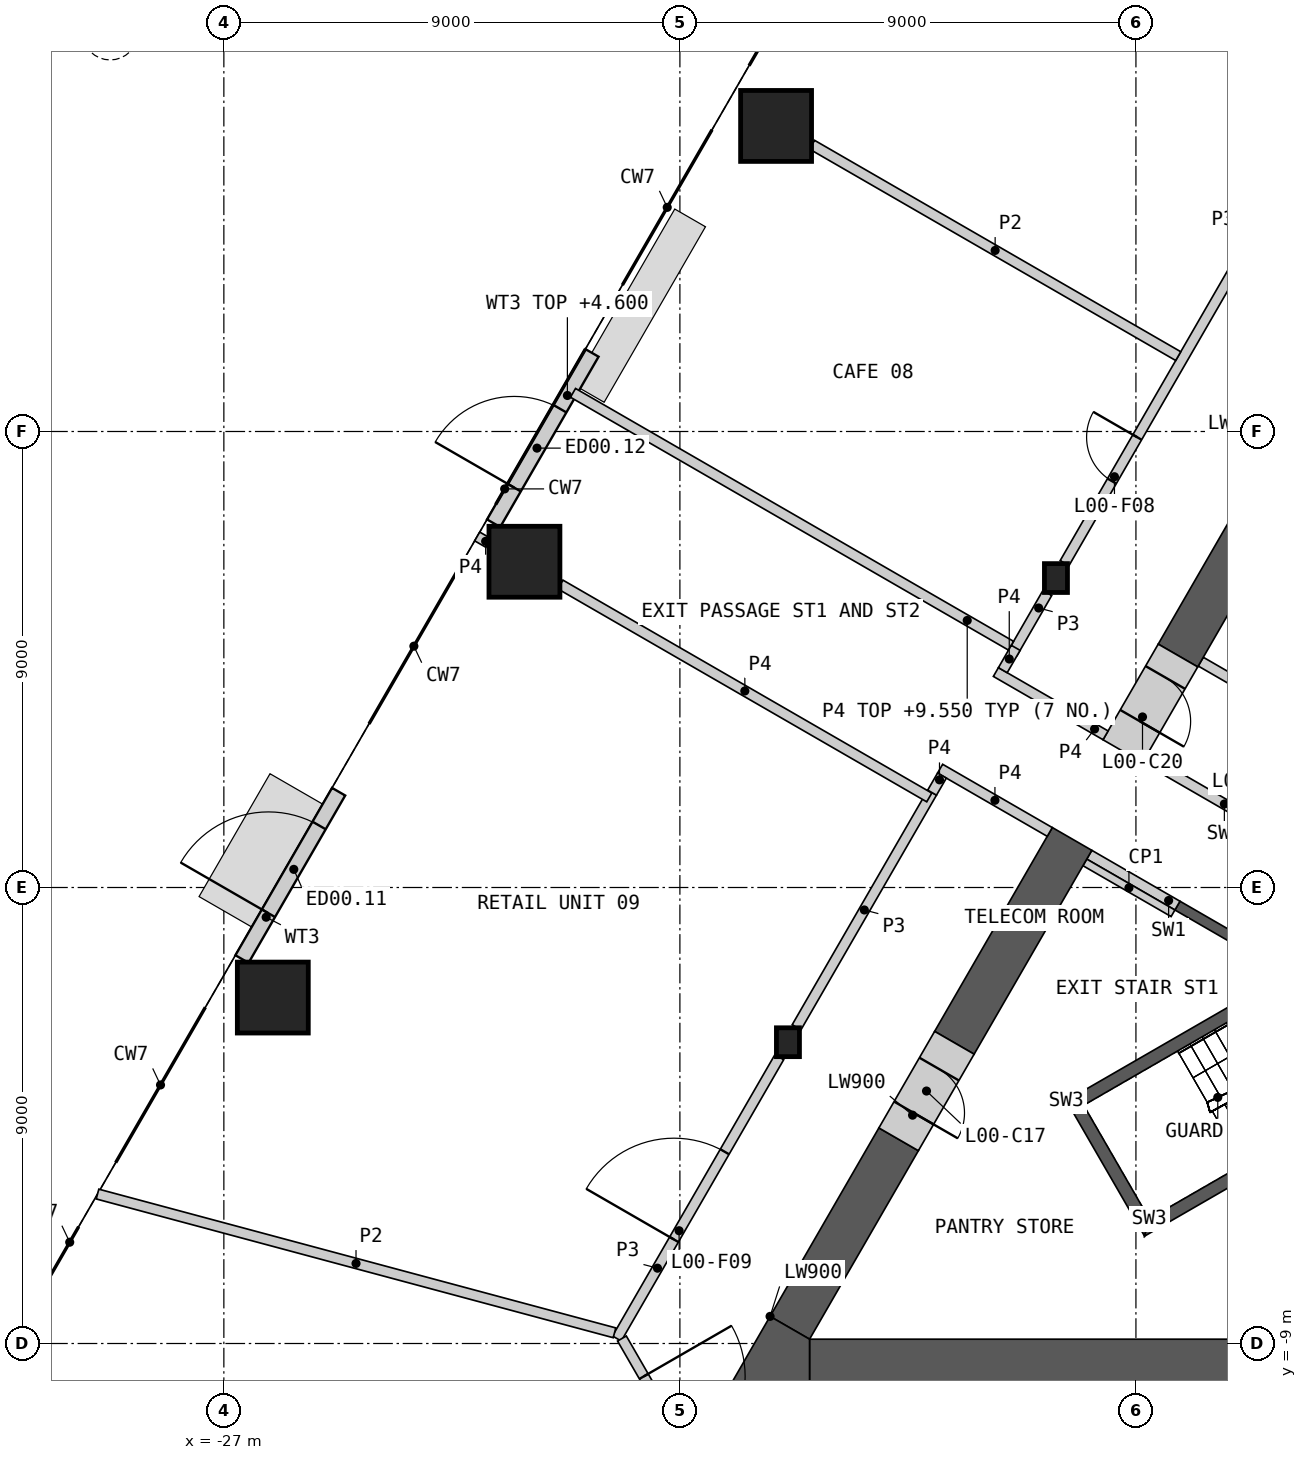
"""IFC4 building model, lengths in metres.
Left out: names, types, materials, properties, quantities, classifications, styles, units other than length and angle.
Written with IfcOpenShell. Run it as: python <this file> out.ifc"""

import sys

from ifc_helpers import new_model, si_unit, direction, frame, frame_2d, origin, origin_2d, place, context, subcontext, project, spatial, polyline, rectangle, hollow_rectangle, i_section, outline, extrude, element, fill, save


model = new_model("IFC4")
c1 = context("Model", 3, precision=1e-05, world=origin(), true_north=direction((0.0, 1.0)))
c2 = subcontext(c1, "Body", "Model", "MODEL_VIEW")
j1 = project(units=[si_unit("LENGTHUNIT", "METRE"), si_unit("PLANEANGLEUNIT", "RADIAN")], contexts=[c1])
p1 = place(None, origin())
s1 = spatial("IfcSite", under=j1, at=p1, CompositionType="ELEMENT")
p2 = place(p1, origin())
s2 = spatial("IfcBuilding", under=s1, at=p2, CompositionType="ELEMENT")
p3 = place(p2, origin())
s3 = spatial("IfcBuildingStorey", under=s2, at=p3, CompositionType="ELEMENT", Elevation=0.0)
for number, where, z_axis, x_axis in (
    (1, (-16.102, 15.031, 0.0), (0.0, 0.0, 1.0), (1.0, 0.0, 0.0)),
    (2, (-21.068, 6.429, 0.0), (0.0, 0.0, 1.0), (1.0, 0.0, 0.0)),
    (3, (-26.034, -2.172, 0.0), (0.0, 0.0, 1.0), (1.0, 0.0, 0.0)),
):
    element("IfcColumn", number, at=place(p3, frame(where, z_axis=z_axis, x_axis=x_axis)), inside=s3, PredefinedType="COLUMN", context=c2, shape_type="SweptSolid", body=[
        extrude(hollow_rectangle(XDim=1.4, YDim=1.4, WallThickness=0.1, at=origin_2d()), origin(), (0.0, 0.0, 1.0), 10.0),
    ])
for number, where, z_axis, x_axis in (
    (4, (-10.578, 6.107, 0.0), (0.0, 0.0, 1.0), (1.0, 0.0, 0.0)),
    (5, (-15.868, -3.054, 0.0), (0.0, 0.0, 1.0), (1.0, 0.0, 0.0)),
):
    element("IfcColumn", number, at=place(p3, frame(where, z_axis=z_axis, x_axis=x_axis)), inside=s3, PredefinedType="COLUMN", context=c2, shape_type="SweptSolid", body=[
        extrude(i_section(OverallWidth=0.454, OverallDepth=0.57, WebThickness=0.078, FlangeThickness=0.125, at=origin_2d()), origin(), (0.0, 0.0, 1.0), 10.0),
    ])
p4 = place(p3, frame((-21.676, 7.189, 0.0), z_axis=(0.0, 0.0, 1.0), x_axis=(0.499994660107, 0.866028486751, 0.0)))
e6 = element("IfcWall", 6, at=p4, inside=s3, PredefinedType="SOLIDWALL", context=c2, shape_type="SweptSolid", body=[
    extrude(rectangle(XDim=3.882, YDim=0.3, at=frame_2d((1.941, 0.0))), origin(), (0.0, 0.0, 1.0), 4.6),
])
p5 = place(p4, frame((0.812, 0.0, 0.0)))
e7 = element("IfcOpeningElement", 7, at=p5, cuts=e6, PredefinedType="OPENING", context=c2, shape_type="SweptSolid", body=[
    extrude(rectangle(XDim=1.8, YDim=2.4, at=frame_2d((0.9, 1.2))), frame((0.0, 0.16, 0.0), z_axis=(0.0, -1.0, 0.0), x_axis=(1.0, 0.0, 0.0)), (0.0, 0.0, 1.0), 0.32),
])
p6 = place(p3, frame((-26.642, -1.412, 0.0), z_axis=(0.0, 0.0, 1.0), x_axis=(0.499973637274, 0.866040623776, 0.0)))
e8 = element("IfcWall", 8, at=p6, inside=s3, PredefinedType="SOLIDWALL", context=c2, shape_type="SweptSolid", body=[
    extrude(rectangle(XDim=3.814, YDim=0.3, at=frame_2d((1.907, 0.0))), origin(), (0.0, 0.0, 1.0), 9.55),
])
p7 = place(p6, frame((1.044, 0.0, 0.0)))
e9 = element("IfcOpeningElement", 9, at=p7, cuts=e8, PredefinedType="OPENING", context=c2, shape_type="SweptSolid", body=[
    extrude(rectangle(XDim=2.0, YDim=3.0, at=frame_2d((1.0, 1.5))), frame((0.0, 0.16, 0.0), z_axis=(0.0, -1.0, 0.0), x_axis=(1.0, 0.0, 0.0)), (0.0, 0.0, 1.0), 0.32),
])
p8 = place(p3, origin())
e10 = element("IfcWall", 10, at=p8, inside=s3, PredefinedType="SHEAR", context=c2, shape_type="SweptSolid", body=[
    extrude(outline(polyline([(-6.061, -1.697), (-8.231, -0.444), (-8.131, -0.271), (-5.96, -1.524), (-6.061, -1.697)])), origin(), (0.0, 0.0, 1.0), 9.55),
])
p9 = place(p3, frame((-5.981, 3.453, 0.0), z_axis=(0.0, 0.0, 1.0), x_axis=(-0.866013584312, 0.500020471368, 0.0)))
e11 = element("IfcWall", 11, at=p9, inside=s3, PredefinedType="SHEAR", context=c2, shape_type="SweptSolid", body=[
    extrude(rectangle(XDim=2.009, YDim=0.2, at=frame_2d((1.005, 0.0))), origin(), (0.0, 0.0, 1.0), 9.55),
])
p10 = place(p3, frame((-7.081, 1.548, 0.0), z_axis=(0.0, 0.0, 1.0), x_axis=(-0.865983199114, 0.50007309351, 0.0)))
e12 = element("IfcWall", 12, at=p10, inside=s3, PredefinedType="SHEAR", context=c2, shape_type="SweptSolid", body=[
    extrude(rectangle(XDim=2.009, YDim=0.2, at=frame_2d((1.004, 0.0))), origin(), (0.0, 0.0, 1.0), 9.55),
])
p11 = place(p3, frame((-8.181, -0.357, 0.0), z_axis=(0.0, 0.0, 1.0), x_axis=(-0.866035824272, 0.499981950752, 0.0)))
e13 = element("IfcWall", 13, at=p11, inside=s3, PredefinedType="SHEAR", context=c2, shape_type="SweptSolid", body=[
    extrude(rectangle(XDim=2.009, YDim=0.2, at=frame_2d((1.004, 0.0))), origin(), (0.0, 0.0, 1.0), 9.55),
])
p12 = place(p3, origin())
e14 = element("IfcWall", 14, at=p12, inside=s3, PredefinedType="SHEAR", context=c2, shape_type="SweptSolid", body=[
    extrude(outline(polyline([(-5.307, -1.281), (-10.374, -4.206), (-10.032, -4.298), (-5.182, -1.498), (-5.307, -1.281)])), origin(), (0.0, 0.0, 1.0), 9.55),
])
p13 = place(p3, origin())
e15 = element("IfcWall", 15, at=p13, inside=s3, PredefinedType="SHEAR", context=c2, shape_type="SweptSolid", body=[
    extrude(outline(polyline([(-10.374, -4.206), (-8.83, -6.881), (-8.738, -6.539), (-10.032, -4.298), (-10.374, -4.206)])), origin(), (0.0, 0.0, 1.0), 9.55),
])
p14 = place(p3, origin())
e16 = element("IfcWall", 16, at=p14, inside=s3, PredefinedType="SHEAR", context=c2, shape_type="SweptSolid", body=[
    extrude(outline(polyline([(-8.738, -6.539), (-8.83, -6.881), (-3.763, -3.956), (-3.888, -3.739), (-8.738, -6.539)])), origin(), (0.0, 0.0, 1.0), 9.55),
])
p15 = place(p3, frame((-8.268, -0.509, 0.0), z_axis=(0.0, 0.0, 1.0), x_axis=(-0.866035824272, 0.499981950752, 0.0)))
e17 = element("IfcWall", 17, at=p15, inside=s3, PredefinedType="PARTITIONING", context=c2, shape_type="SweptSolid", body=[
    extrude(rectangle(XDim=2.009, YDim=0.15, at=frame_2d((1.004, 0.0))), origin(), (0.0, 0.0, 1.0), 9.55),
])
p16 = place(p3, frame((-15.441, -9.365, 0.0), z_axis=(0.0, 0.0, 1.0), x_axis=(1.0, 0.0, 0.0)))
e18 = element("IfcWall", 18, at=p16, inside=s3, PredefinedType="SHEAR", context=c2, shape_type="SweptSolid", body=[
    extrude(rectangle(XDim=14.341, YDim=0.9, at=frame_2d((7.17, 0.0))), origin(), (0.0, 0.0, 1.0), 9.55),
])
p17 = place(p3, frame((-3.637, 12.43, 0.0), z_axis=(0.0, 0.0, 1.0), x_axis=(-0.500011513458, -0.866018756384, 0.0)))
e19 = element("IfcWall", 19, at=p17, inside=s3, PredefinedType="SHEAR", context=c2, shape_type="SweptSolid", body=[
    extrude(rectangle(XDim=9.066, YDim=0.9, at=frame_2d((4.533, 0.0))), origin(), (0.0, 0.0, 1.0), 9.55),
])
p18 = place(p3, frame((-10.26, 0.958, 0.0), z_axis=(0.0, 0.0, 1.0), x_axis=(-0.499993887256, -0.86602893295, 0.0)))
e20 = element("IfcWall", 20, at=p18, inside=s3, PredefinedType="SHEAR", context=c2, shape_type="SweptSolid", body=[
    extrude(rectangle(XDim=4.646, YDim=0.9, at=frame_2d((2.323, 0.0))), origin(), (0.0, 0.0, 1.0), 9.55),
])
p19 = place(p3, frame((-13.683, -4.97, 0.0), z_axis=(0.0, 0.0, 1.0), x_axis=(-0.499996331799, -0.866027521611, 0.0)))
e21 = element("IfcWall", 21, at=p19, inside=s3, PredefinedType="SHEAR", context=c2, shape_type="SweptSolid", body=[
    extrude(rectangle(XDim=4.295, YDim=0.9, at=frame_2d((2.148, 0.0))), origin(), (0.0, 0.0, 1.0), 9.55),
])
p20 = place(p3, origin())
e22 = element("IfcWall", 22, at=p20, inside=s3, PredefinedType="SHEAR", context=c2, shape_type="SweptSolid", body=[
    extrude(outline(polyline([(-16.221, -8.465), (-15.441, -8.915), (-15.441, -9.815), (-17.0, -9.815), (-16.221, -8.465)])), origin(), (0.0, 0.0, 1.0), 9.55),
])
p21 = place(p3, frame((-12.583, -3.065, 0.0), z_axis=(0.0, 0.0, 1.0), x_axis=(-0.50002983664, -0.866008176907, 0.0)))
e23 = element("IfcWall", 23, at=p21, inside=s3, PredefinedType="SHEAR", context=c2, shape_type="SweptSolid", body=[
    extrude(rectangle(XDim=2.2, YDim=0.9, at=frame_2d((1.1, 0.0))), origin(), (0.0, 0.0, 1.0), 9.55),
])
p22 = place(p21, frame((0.6, 0.0, 0.0)))
e24 = element("IfcOpeningElement", 24, at=p22, cuts=e23, PredefinedType="OPENING", context=c2, shape_type="SweptSolid", body=[
    extrude(rectangle(XDim=1.0, YDim=2.1, at=frame_2d((0.5, 1.05))), frame((0.0, 0.46, 0.0), z_axis=(0.0, -1.0, 0.0), x_axis=(1.0, 0.0, 0.0)), (0.0, 0.0, 1.0), 0.92),
])
p23 = place(p3, frame((-8.17, 4.579, 0.0), z_axis=(0.0, 0.0, 1.0), x_axis=(-0.499945432413, -0.866056906104, 0.0)))
e25 = element("IfcWall", 25, at=p23, inside=s3, PredefinedType="SHEAR", context=c2, shape_type="SweptSolid", body=[
    extrude(rectangle(XDim=2.18, YDim=0.9, at=frame_2d((1.09, 0.0))), origin(), (0.0, 0.0, 1.0), 9.55),
])
p24 = place(p23, frame((0.5, 0.0, 0.0)))
e26 = element("IfcOpeningElement", 26, at=p24, cuts=e25, PredefinedType="OPENING", context=c2, shape_type="SweptSolid", body=[
    extrude(rectangle(XDim=1.0, YDim=2.1, at=frame_2d((0.5, 1.05))), frame((0.0, 0.46, 0.0), z_axis=(0.0, -1.0, 0.0), x_axis=(1.0, 0.0, 0.0)), (0.0, 0.0, 1.0), 0.92),
])
p25 = place(p3, frame((-10.408, 6.402, 0.0), z_axis=(0.0, 0.0, 1.0), x_axis=(0.499985793049, 0.866033606016, 0.0)))
e27 = element("IfcWall", 27, at=p25, inside=s3, PredefinedType="PARTITIONING", context=c2, shape_type="SweptSolid", body=[
    extrude(rectangle(XDim=9.898, YDim=0.2, at=frame_2d((4.949, 0.0))), origin(), (0.0, 0.0, 1.0), 9.55),
])
p26 = place(p25, frame((1.869, 0.0, 0.0)))
e28 = element("IfcOpeningElement", 28, at=p26, cuts=e27, PredefinedType="OPENING", context=c2, shape_type="SweptSolid", body=[
    extrude(rectangle(XDim=1.0, YDim=2.1, at=frame_2d((0.5, 1.05))), frame((0.0, 0.11, 0.0), z_axis=(0.0, -1.0, 0.0), x_axis=(1.0, 0.0, 0.0)), (0.0, 0.0, 1.0), 0.22),
])
p27 = place(p3, frame((-19.244, -8.902, 0.0), z_axis=(0.0, 0.0, 1.0), x_axis=(0.499988314375, 0.866032150378, 0.0)))
e29 = element("IfcWall", 29, at=p27, inside=s3, PredefinedType="PARTITIONING", context=c2, shape_type="SweptSolid", body=[
    extrude(rectangle(XDim=6.412, YDim=0.2, at=frame_2d((3.206, 0.0))), origin(), (0.0, 0.0, 1.0), 9.55),
])
p28 = place(p27, frame((2.256, 0.0, 0.0)))
e30 = element("IfcOpeningElement", 30, at=p28, cuts=e29, PredefinedType="OPENING", context=c2, shape_type="SweptSolid", body=[
    extrude(rectangle(XDim=2.0, YDim=2.1, at=frame_2d((1.0, 1.05))), frame((0.0, 0.11, 0.0), z_axis=(0.0, -1.0, 0.0), x_axis=(1.0, 0.0, 0.0)), (0.0, 0.0, 1.0), 0.22),
])
p29 = place(p3, frame((-15.698, -2.759, 0.0), z_axis=(0.0, 0.0, 1.0), x_axis=(0.500125484666, 0.865952943056, 0.0)))
e31 = element("IfcWall", 31, at=p29, inside=s3, PredefinedType="PARTITIONING", context=c2, shape_type="SweptSolid", body=[
    extrude(rectangle(XDim=5.348, YDim=0.2, at=frame_2d((2.674, 0.0))), origin(), (0.0, 0.0, 1.0), 9.55),
])
p30 = place(p3, frame((-19.144, -8.902, 0.0), z_axis=(0.0, 0.0, 1.0), x_axis=(0.499958791762, -0.866049194065, 0.0)))
e32 = element("IfcWall", 32, at=p30, inside=s3, PredefinedType="PARTITIONING", context=c2, shape_type="SweptSolid", body=[
    extrude(rectangle(XDim=3.726, YDim=0.2, at=frame_2d((1.863, 0.0))), origin(), (0.0, 0.0, 1.0), 9.55),
])
p31 = place(p30, frame((0.863, 0.0, 0.0)))
e33 = element("IfcOpeningElement", 33, at=p31, cuts=e32, PredefinedType="OPENING", context=c2, shape_type="SweptSolid", body=[
    extrude(rectangle(XDim=2.0, YDim=2.1, at=frame_2d((1.0, 1.05))), frame((0.0, 0.11, 0.0), z_axis=(0.0, -1.0, 0.0), x_axis=(1.0, 0.0, 0.0)), (0.0, 0.0, 1.0), 0.22),
])
p32 = place(p3, frame((-11.432, 4.627, 0.0), z_axis=(0.0, 0.0, 1.0), x_axis=(0.499650385877, 0.866227159522, 0.0)))
e34 = element("IfcWall", 34, at=p32, inside=s3, PredefinedType="PARTITIONING", context=c2, shape_type="SweptSolid", body=[
    extrude(rectangle(XDim=1.369, YDim=0.2, at=frame_2d((0.684, 0.0))), origin(), (0.0, 0.0, 1.0), 9.55),
])
p33 = place(p3, frame((-29.493, -6.051, 0.0), z_axis=(0.0, 0.0, 1.0), x_axis=(0.965815181093, -0.259231626099, 0.0)))
e35 = element("IfcWall", 35, at=p33, inside=s3, PredefinedType="PARTITIONING", context=c2, shape_type="SweptSolid", body=[
    extrude(rectangle(XDim=10.564, YDim=0.2, at=frame_2d((5.282, 0.0))), origin(), (0.0, 0.0, 1.0), 9.55),
])
p34 = place(p3, frame((-15.392, 14.66, 0.0), z_axis=(0.0, 0.0, 1.0), x_axis=(0.866027244746, -0.499996811348, 0.0)))
e36 = element("IfcWall", 36, at=p34, inside=s3, PredefinedType="PARTITIONING", context=c2, shape_type="SweptSolid", body=[
    extrude(rectangle(XDim=8.345, YDim=0.2, at=frame_2d((4.172, 0.0))), origin(), (0.0, 0.0, 1.0), 9.55),
])
p35 = place(p3, frame((-20.109, 9.763, 0.0), z_axis=(0.0, 0.0, 1.0), x_axis=(0.866017364883, -0.500013923527, 0.0)))
e37 = element("IfcWall", 37, at=p35, inside=s3, PredefinedType="PARTITIONING", context=c2, shape_type="SweptSolid", body=[
    extrude(rectangle(XDim=9.982, YDim=0.2, at=frame_2d((4.991, 0.0))), origin(), (0.0, 0.0, 1.0), 9.55),
])
p36 = place(p3, frame((-20.358, 5.98, 0.0), z_axis=(0.0, 0.0, 1.0), x_axis=(0.866028870366, -0.499993995656, 0.0)))
e38 = element("IfcWall", 38, at=p36, inside=s3, PredefinedType="PARTITIONING", context=c2, shape_type="SweptSolid", body=[
    extrude(rectangle(XDim=8.405, YDim=0.2, at=frame_2d((4.203, 0.0))), origin(), (0.0, 0.0, 1.0), 9.55),
])
p37 = place(p3, frame((-11.764, 4.253, 0.0), z_axis=(0.0, 0.0, 1.0), x_axis=(0.86600986831, -0.500026907266, 0.0)))
e39 = element("IfcWall", 39, at=p37, inside=s3, PredefinedType="PARTITIONING", context=c2, shape_type="SweptSolid", body=[
    extrude(rectangle(XDim=2.499, YDim=0.2, at=frame_2d((1.25, 0.0))), origin(), (0.0, 0.0, 1.0), 9.55),
])
p38 = place(p3, frame((-12.865, 2.346, 0.0), z_axis=(0.0, 0.0, 1.0), x_axis=(0.866034292756, -0.499984603534, 0.0)))
e40 = element("IfcWall", 40, at=p38, inside=s3, PredefinedType="PARTITIONING", context=c2, shape_type="SweptSolid", body=[
    extrude(rectangle(XDim=2.499, YDim=0.2, at=frame_2d((1.25, 0.0))), origin(), (0.0, 0.0, 1.0), 9.55),
])
p39 = place(p3, frame((-11.627, 4.289, 0.0), z_axis=(0.0, 0.0, 1.0), x_axis=(0.499750133086, 0.866169616461, 0.0)))
e41 = element("IfcWall", 41, at=p39, inside=s3, PredefinedType="PARTITIONING", context=c2, shape_type="SweptSolid", body=[
    extrude(rectangle(XDim=0.509, YDim=0.2, at=frame_2d((0.254, 0.0))), origin(), (0.0, 0.0, 1.0), 9.55),
])
p40 = place(p3, frame((-13.023, 1.872, 0.0), z_axis=(0.0, 0.0, 1.0), x_axis=(0.500392655802, 0.865798585133, 0.0)))
e42 = element("IfcWall", 42, at=p40, inside=s3, PredefinedType="PARTITIONING", context=c2, shape_type="SweptSolid", body=[
    extrude(rectangle(XDim=0.389, YDim=0.2, at=frame_2d((0.194, 0.0))), origin(), (0.0, 0.0, 1.0), 9.55),
])
p41 = place(p3, frame((-22.0, 6.928, 0.0), z_axis=(0.0, 0.0, 1.0), x_axis=(0.866185586049, -0.49972245349, 0.0)))
e43 = element("IfcWall", 43, at=p41, inside=s3, PredefinedType="PARTITIONING", context=c2, shape_type="SweptSolid", body=[
    extrude(rectangle(XDim=0.257, YDim=0.2, at=frame_2d((0.128, 0.0))), origin(), (0.0, 0.0, 1.0), 9.55),
])
p42 = place(p5, origin())
e44 = element("IfcDoor", 44, at=p42, inside=s3, OperationType="DOUBLE_DOOR_SINGLE_SWING", PredefinedType="DOOR", context=c2, shape_type="SweptSolid", body=[
    extrude(rectangle(XDim=1.8, YDim=2.4, at=frame_2d((0.9, 1.2))), frame((0.0, 0.025, 0.0), z_axis=(0.0, -1.0, 0.0), x_axis=(1.0, 0.0, 0.0)), (0.0, 0.0, 1.0), 0.05),
])
fill(e7, e44)
p43 = place(p7, origin())
e45 = element("IfcDoor", 45, at=p43, inside=s3, OperationType="DOUBLE_DOOR_SINGLE_SWING", PredefinedType="DOOR", context=c2, shape_type="SweptSolid", body=[
    extrude(rectangle(XDim=2.0, YDim=3.0, at=frame_2d((1.0, 1.5))), frame((0.0, 0.025, 0.0), z_axis=(0.0, -1.0, 0.0), x_axis=(1.0, 0.0, 0.0)), (0.0, 0.0, 1.0), 0.05),
])
fill(e9, e45)
p44 = place(p22, origin())
e46 = element("IfcDoor", 46, at=p44, inside=s3, OperationType="SINGLE_SWING_RIGHT", PredefinedType="DOOR", context=c2, shape_type="SweptSolid", body=[
    extrude(rectangle(XDim=1.0, YDim=2.1, at=frame_2d((0.5, 1.05))), frame((0.0, 0.205, 0.0), z_axis=(0.0, -1.0, 0.0), x_axis=(1.0, 0.0, 0.0)), (0.0, 0.0, 1.0), 0.05),
])
fill(e24, e46)
p45 = place(p24, origin())
e47 = element("IfcDoor", 47, at=p45, inside=s3, OperationType="SINGLE_SWING_RIGHT", PredefinedType="DOOR", context=c2, shape_type="SweptSolid", body=[
    extrude(rectangle(XDim=1.0, YDim=2.1, at=frame_2d((0.5, 1.05))), frame((0.0, 0.205, 0.0), z_axis=(0.0, -1.0, 0.0), x_axis=(1.0, 0.0, 0.0)), (0.0, 0.0, 1.0), 0.05),
])
fill(e26, e47)
p46 = place(p26, origin())
e48 = element("IfcDoor", 48, at=p46, inside=s3, OperationType="SINGLE_SWING_RIGHT", PredefinedType="DOOR", context=c2, shape_type="SweptSolid", body=[
    extrude(rectangle(XDim=1.0, YDim=2.1, at=frame_2d((0.5, 1.05))), frame((0.0, 0.025, 0.0), z_axis=(0.0, -1.0, 0.0), x_axis=(1.0, 0.0, 0.0)), (0.0, 0.0, 1.0), 0.05),
])
fill(e28, e48)
p47 = place(p28, origin())
e49 = element("IfcDoor", 49, at=p47, inside=s3, OperationType="DOUBLE_DOOR_SINGLE_SWING", PredefinedType="DOOR", context=c2, shape_type="SweptSolid", body=[
    extrude(rectangle(XDim=2.0, YDim=2.1, at=frame_2d((1.0, 1.05))), frame((0.0, 0.025, 0.0), z_axis=(0.0, -1.0, 0.0), x_axis=(1.0, 0.0, 0.0)), (0.0, 0.0, 1.0), 0.05),
])
fill(e30, e49)
p48 = place(p31, origin())
e50 = element("IfcDoor", 50, at=p48, inside=s3, OperationType="DOUBLE_DOOR_SINGLE_SWING", PredefinedType="DOOR", context=c2, shape_type="SweptSolid", body=[
    extrude(rectangle(XDim=2.0, YDim=2.1, at=frame_2d((1.0, 1.05))), frame((0.0, 0.025, 0.0), z_axis=(0.0, -1.0, 0.0), x_axis=(1.0, 0.0, 0.0)), (0.0, 0.0, 1.0), 0.05),
])
fill(e33, e50)
save(model, sys.argv[1])
